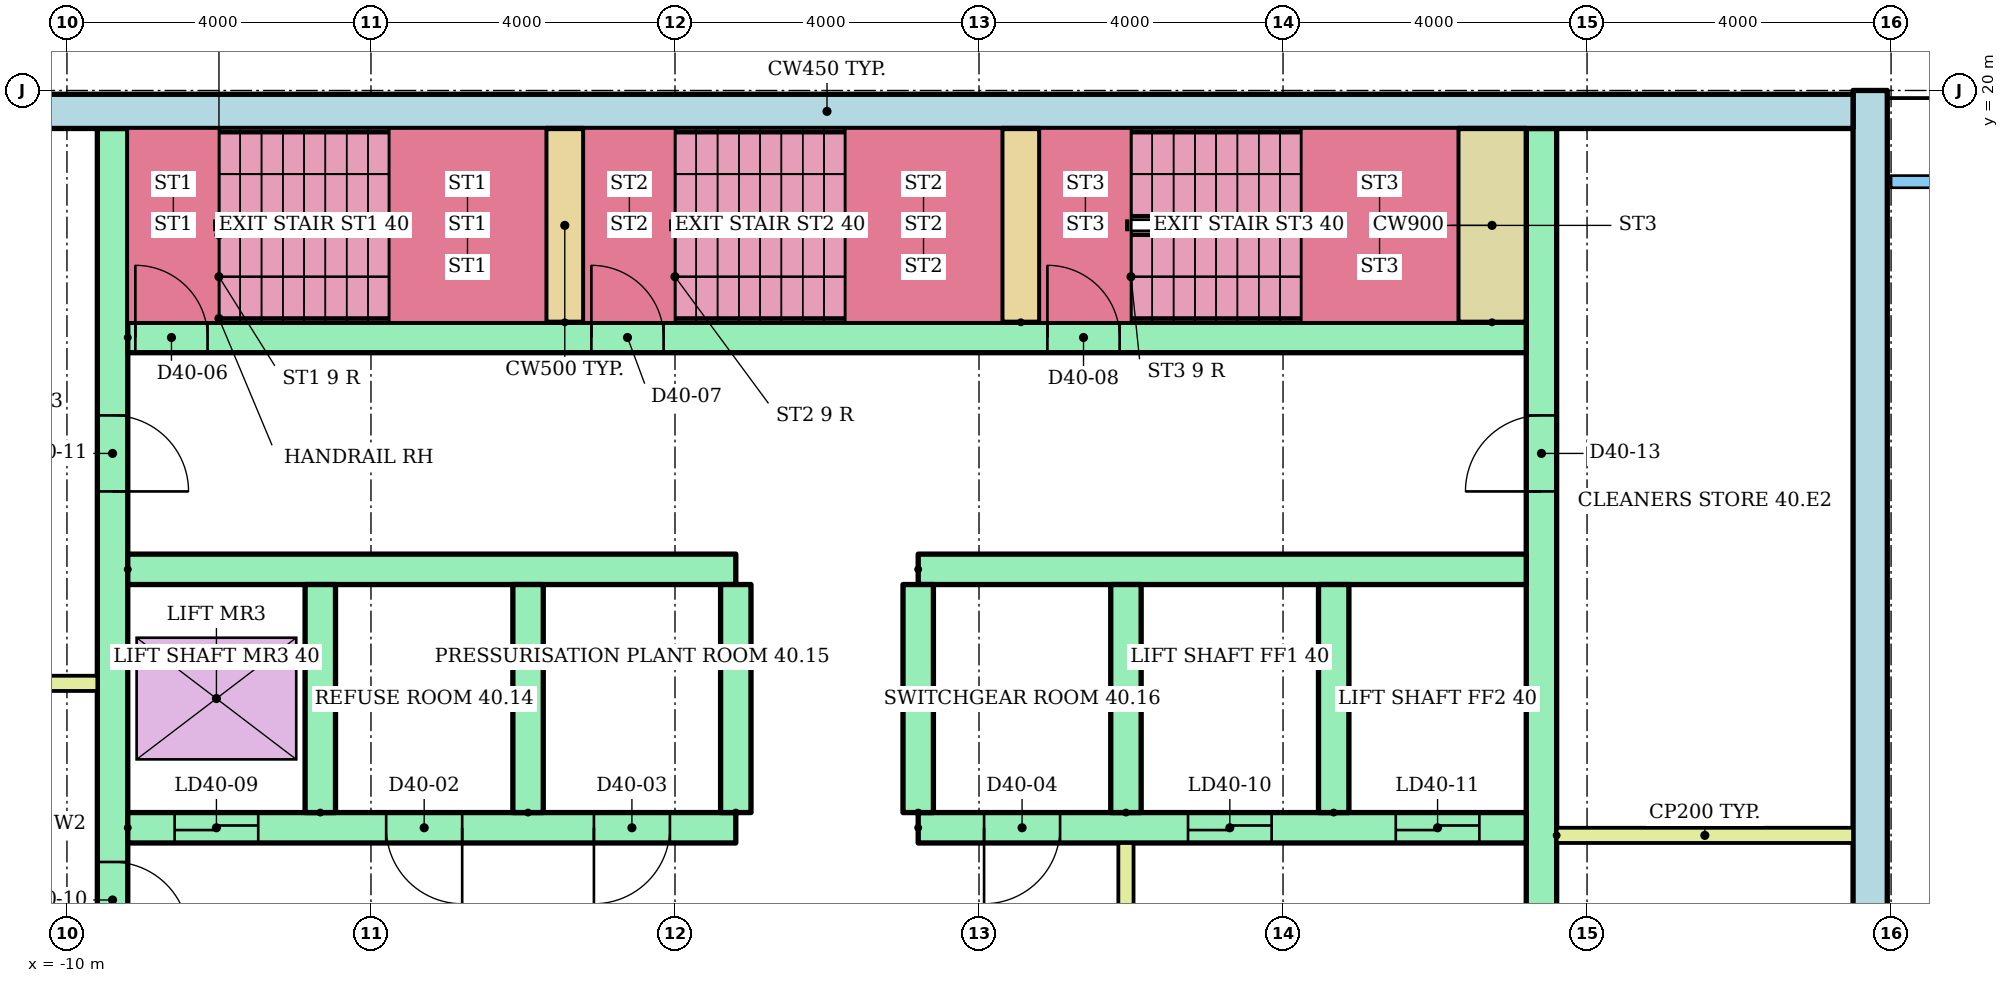
"""IFC4 building model, lengths in metres.
Left out: names, types, materials, properties, quantities, classifications, styles, units other than length and angle.
Written with IfcOpenShell. Run it as: python <this file> out.ifc"""

import sys

from ifc_helpers import new_model, si_unit, direction, frame, frame_2d, origin, place, context, subcontext, project, spatial, rectangle, extrude, element, fill, save


model = new_model("IFC4")
c1 = context("Model", 3, precision=1e-05, world=origin(), true_north=direction((0.0, 1.0)))
c2 = subcontext(c1, "Body", "Model", "MODEL_VIEW")
j1 = project(units=[si_unit("LENGTHUNIT", "METRE"), si_unit("PLANEANGLEUNIT", "RADIAN")], contexts=[c1])
p1 = place(None, origin())
s1 = spatial("IfcSite", under=j1, at=p1, CompositionType="ELEMENT")
p2 = place(p1, origin())
s2 = spatial("IfcBuilding", under=s1, at=p2, CompositionType="ELEMENT")
p3 = place(p2, frame((0.0, 0.0, 151.8)))
s3 = spatial("IfcBuildingStorey", under=s2, at=p3, CompositionType="ELEMENT", Elevation=151.8)
p4 = place(p3, frame((13.725, 3.0, 0.0), z_axis=(0.0, 0.0, 1.0), x_axis=(0.0, 1.0, 0.0)))
e1 = element("IfcWall", 1, at=p4, inside=s3, PredefinedType="SHEAR", context=c2, shape_type="SweptSolid", body=[
    extrude(rectangle(XDim=17.0, YDim=0.45, at=frame_2d((8.5, 0.0))), origin(), (0.0, 0.0, 1.0), 8.8),
])
p5 = place(p3, frame((-13.5, 19.725, 0.0)))
e2 = element("IfcWall", 2, at=p5, inside=s3, PredefinedType="SHEAR", context=c2, shape_type="SweptSolid", body=[
    extrude(rectangle(XDim=27.0, YDim=0.45, at=frame_2d((13.5, 0.0))), origin(), (0.0, 0.0, 1.0), 8.8),
])
p6 = place(p3, frame((-9.4, 6.8, 0.0), z_axis=(0.0, 0.0, 1.0), x_axis=(0.0, 1.0, 0.0)))
e3 = element("IfcWall", 3, at=p6, inside=s3, PredefinedType="SHEAR", context=c2, shape_type="SweptSolid", body=[
    extrude(rectangle(XDim=12.7, YDim=0.4, at=frame_2d((6.35, 0.0))), origin(), (0.0, 0.0, 1.0), 8.8),
])
p7 = place(p6, frame((0.3, 0.0, 0.0)))
e4 = element("IfcOpeningElement", 4, at=p7, cuts=e3, PredefinedType="OPENING", context=c2, shape_type="SweptSolid", body=[
    extrude(rectangle(XDim=1.0, YDim=2.1, at=frame_2d((0.5, 1.05))), frame((0.0, 0.21, 0.0), z_axis=(0.0, -1.0, 0.0), x_axis=(1.0, 0.0, 0.0)), (0.0, 0.0, 1.0), 0.42),
])
p8 = place(p6, frame((2.05, 0.0, 0.0)))
e5 = element("IfcOpeningElement", 5, at=p8, cuts=e3, PredefinedType="OPENING", context=c2, shape_type="SweptSolid", body=[
    extrude(rectangle(XDim=1.0, YDim=2.1, at=frame_2d((0.5, 1.05))), frame((0.0, 0.21, 0.0), z_axis=(0.0, -1.0, 0.0), x_axis=(1.0, 0.0, 0.0)), (0.0, 0.0, 1.0), 0.42),
])
p9 = place(p6, frame((7.925, 0.0, 0.0)))
e6 = element("IfcOpeningElement", 6, at=p9, cuts=e3, PredefinedType="OPENING", context=c2, shape_type="SweptSolid", body=[
    extrude(rectangle(XDim=1.0, YDim=2.1, at=frame_2d((0.5, 1.05))), frame((0.0, 0.21, 0.0), z_axis=(0.0, -1.0, 0.0), x_axis=(1.0, 0.0, 0.0)), (0.0, 0.0, 1.0), 0.42),
])
p10 = place(p3, frame((9.4, 6.8, 0.0), z_axis=(0.0, 0.0, 1.0), x_axis=(0.0, 1.0, 0.0)))
e7 = element("IfcWall", 7, at=p10, inside=s3, PredefinedType="SHEAR", context=c2, shape_type="SweptSolid", body=[
    extrude(rectangle(XDim=12.7, YDim=0.4, at=frame_2d((6.35, 0.0))), origin(), (0.0, 0.0, 1.0), 8.8),
])
p11 = place(p10, frame((1.15, 0.0, 0.0)))
e8 = element("IfcOpeningElement", 8, at=p11, cuts=e7, PredefinedType="OPENING", context=c2, shape_type="SweptSolid", body=[
    extrude(rectangle(XDim=1.0, YDim=2.1, at=frame_2d((0.5, 1.05))), frame((0.0, 0.21, 0.0), z_axis=(0.0, -1.0, 0.0), x_axis=(1.0, 0.0, 0.0)), (0.0, 0.0, 1.0), 0.42),
])
p12 = place(p10, frame((7.925, 0.0, 0.0)))
e9 = element("IfcOpeningElement", 9, at=p12, cuts=e7, PredefinedType="OPENING", context=c2, shape_type="SweptSolid", body=[
    extrude(rectangle(XDim=1.0, YDim=2.1, at=frame_2d((0.5, 1.05))), frame((0.0, 0.21, 0.0), z_axis=(0.0, -1.0, 0.0), x_axis=(1.0, 0.0, 0.0)), (0.0, 0.0, 1.0), 0.42),
])
p13 = place(p3, frame((-9.2, 10.3, 0.0)))
e10 = element("IfcWall", 10, at=p13, inside=s3, PredefinedType="SHEAR", context=c2, shape_type="SweptSolid", body=[
    extrude(rectangle(XDim=8.0, YDim=0.4, at=frame_2d((4.0, 0.0))), origin(), (0.0, 0.0, 1.0), 8.8),
])
p14 = place(p13, frame((0.617, 0.0, 0.0)))
e11 = element("IfcOpeningElement", 11, at=p14, cuts=e10, PredefinedType="OPENING", context=c2, shape_type="SweptSolid", body=[
    extrude(rectangle(XDim=1.1, YDim=2.1, at=frame_2d((0.55, 1.05))), frame((0.0, 0.21, 0.0), z_axis=(0.0, -1.0, 0.0), x_axis=(1.0, 0.0, 0.0)), (0.0, 0.0, 1.0), 0.42),
])
p15 = place(p13, frame((3.4, 0.0, 0.0)))
e12 = element("IfcOpeningElement", 12, at=p15, cuts=e10, PredefinedType="OPENING", context=c2, shape_type="SweptSolid", body=[
    extrude(rectangle(XDim=1.0, YDim=2.1, at=frame_2d((0.5, 1.05))), frame((0.0, 0.21, 0.0), z_axis=(0.0, -1.0, 0.0), x_axis=(1.0, 0.0, 0.0)), (0.0, 0.0, 1.0), 0.42),
])
p16 = place(p13, frame((6.133, 0.0, 0.0)))
e13 = element("IfcOpeningElement", 13, at=p16, cuts=e10, PredefinedType="OPENING", context=c2, shape_type="SweptSolid", body=[
    extrude(rectangle(XDim=1.0, YDim=2.1, at=frame_2d((0.5, 1.05))), frame((0.0, 0.21, 0.0), z_axis=(0.0, -1.0, 0.0), x_axis=(1.0, 0.0, 0.0)), (0.0, 0.0, 1.0), 0.42),
])
p17 = place(p3, frame((-9.2, 13.7, 0.0)))
e14 = element("IfcWall", 14, at=p17, inside=s3, PredefinedType="SHEAR", context=c2, shape_type="SweptSolid", body=[
    extrude(rectangle(XDim=8.0, YDim=0.4, at=frame_2d((4.0, 0.0))), origin(), (0.0, 0.0, 1.0), 8.8),
])
p18 = place(p3, frame((1.2, 10.3, 0.0)))
e15 = element("IfcWall", 15, at=p18, inside=s3, PredefinedType="SHEAR", context=c2, shape_type="SweptSolid", body=[
    extrude(rectangle(XDim=8.0, YDim=0.4, at=frame_2d((4.0, 0.0))), origin(), (0.0, 0.0, 1.0), 8.8),
])
p19 = place(p18, frame((3.55, 0.0, 0.0)))
e16 = element("IfcOpeningElement", 16, at=p19, cuts=e15, PredefinedType="OPENING", context=c2, shape_type="SweptSolid", body=[
    extrude(rectangle(XDim=1.1, YDim=2.1, at=frame_2d((0.55, 1.05))), frame((0.0, 0.21, 0.0), z_axis=(0.0, -1.0, 0.0), x_axis=(1.0, 0.0, 0.0)), (0.0, 0.0, 1.0), 0.42),
])
p20 = place(p18, frame((6.283, 0.0, 0.0)))
e17 = element("IfcOpeningElement", 17, at=p20, cuts=e15, PredefinedType="OPENING", context=c2, shape_type="SweptSolid", body=[
    extrude(rectangle(XDim=1.1, YDim=2.1, at=frame_2d((0.55, 1.05))), frame((0.0, 0.21, 0.0), z_axis=(0.0, -1.0, 0.0), x_axis=(1.0, 0.0, 0.0)), (0.0, 0.0, 1.0), 0.42),
])
p21 = place(p18, frame((0.867, 0.0, 0.0)))
e18 = element("IfcOpeningElement", 18, at=p21, cuts=e15, PredefinedType="OPENING", context=c2, shape_type="SweptSolid", body=[
    extrude(rectangle(XDim=1.0, YDim=2.1, at=frame_2d((0.5, 1.05))), frame((0.0, 0.21, 0.0), z_axis=(0.0, -1.0, 0.0), x_axis=(1.0, 0.0, 0.0)), (0.0, 0.0, 1.0), 0.42),
])
p22 = place(p3, frame((1.2, 13.7, 0.0)))
e19 = element("IfcWall", 19, at=p22, inside=s3, PredefinedType="SHEAR", context=c2, shape_type="SweptSolid", body=[
    extrude(rectangle(XDim=8.0, YDim=0.4, at=frame_2d((4.0, 0.0))), origin(), (0.0, 0.0, 1.0), 8.8),
])
for number, where, z_axis, x_axis in (
    (20, (-6.667, 10.5, 0.0), (0.0, 0.0, 1.0), (0.0, 1.0, 0.0)),
    (21, (-3.933, 10.5, 0.0), (0.0, 0.0, 1.0), (0.0, 1.0, 0.0)),
    (22, (-1.2, 10.5, 0.0), (0.0, 0.0, 1.0), (0.0, 1.0, 0.0)),
    (23, (1.2, 10.5, 0.0), (0.0, 0.0, 1.0), (0.0, 1.0, 0.0)),
    (24, (3.933, 10.5, 0.0), (0.0, 0.0, 1.0), (0.0, 1.0, 0.0)),
    (25, (6.667, 10.5, 0.0), (0.0, 0.0, 1.0), (0.0, 1.0, 0.0)),
):
    element("IfcWall", number, at=place(p3, frame(where, z_axis=z_axis, x_axis=x_axis)), inside=s3, PredefinedType="SHEAR", context=c2, shape_type="SweptSolid", body=[
        extrude(rectangle(XDim=3.0, YDim=0.4, at=frame_2d((1.5, 0.0))), origin(), (0.0, 0.0, 1.0), 8.8),
    ])
p23 = place(p3, frame((3.933, 6.8, 0.0), z_axis=(0.0, 0.0, 1.0), x_axis=(0.0, 1.0, 0.0)))
e26 = element("IfcWall", 26, at=p23, inside=s3, PredefinedType="PARTITIONING", context=c2, shape_type="SweptSolid", body=[
    extrude(rectangle(XDim=3.3, YDim=0.2, at=frame_2d((1.65, 0.0))), origin(), (0.0, 0.0, 1.0), 8.8),
])
p24 = place(p23, frame((1.1, 0.0, 0.0)))
e27 = element("IfcOpeningElement", 27, at=p24, cuts=e26, PredefinedType="OPENING", context=c2, shape_type="SweptSolid", body=[
    extrude(rectangle(XDim=1.1, YDim=2.1, at=frame_2d((0.55, 1.05))), frame((0.0, 0.11, 0.0), z_axis=(0.0, -1.0, 0.0), x_axis=(1.0, 0.0, 0.0)), (0.0, 0.0, 1.0), 0.22),
])
p25 = place(p3, frame((-9.2, 16.75, 0.0)))
e28 = element("IfcWall", 28, at=p25, inside=s3, PredefinedType="SHEAR", context=c2, shape_type="SweptSolid", body=[
    extrude(rectangle(XDim=18.4, YDim=0.4, at=frame_2d((9.2, 0.0))), origin(), (0.0, 0.0, 1.0), 8.8),
])
p26 = place(p25, frame((0.1, 0.0, 0.0)))
e29 = element("IfcOpeningElement", 29, at=p26, cuts=e28, PredefinedType="OPENING", context=c2, shape_type="SweptSolid", body=[
    extrude(rectangle(XDim=0.95, YDim=2.1, at=frame_2d((0.475, 1.05))), frame((0.0, 0.21, 0.0), z_axis=(0.0, -1.0, 0.0), x_axis=(1.0, 0.0, 0.0)), (0.0, 0.0, 1.0), 0.42),
])
p27 = place(p25, frame((6.1, 0.0, 0.0)))
e30 = element("IfcOpeningElement", 30, at=p27, cuts=e28, PredefinedType="OPENING", context=c2, shape_type="SweptSolid", body=[
    extrude(rectangle(XDim=0.95, YDim=2.1, at=frame_2d((0.475, 1.05))), frame((0.0, 0.21, 0.0), z_axis=(0.0, -1.0, 0.0), x_axis=(1.0, 0.0, 0.0)), (0.0, 0.0, 1.0), 0.42),
])
p28 = place(p25, frame((12.1, 0.0, 0.0)))
e31 = element("IfcOpeningElement", 31, at=p28, cuts=e28, PredefinedType="OPENING", context=c2, shape_type="SweptSolid", body=[
    extrude(rectangle(XDim=0.95, YDim=2.1, at=frame_2d((0.475, 1.05))), frame((0.0, 0.21, 0.0), z_axis=(0.0, -1.0, 0.0), x_axis=(1.0, 0.0, 0.0)), (0.0, 0.0, 1.0), 0.42),
])
for number, where, z_axis, x_axis in (
    (32, (-3.45, 16.95, 0.0), (0.0, 0.0, 1.0), (0.0, 1.0, 0.0)),
    (33, (2.55, 16.95, 0.0), (0.0, 0.0, 1.0), (0.0, 1.0, 0.0)),
):
    element("IfcWall", number, at=place(p3, frame(where, z_axis=z_axis, x_axis=x_axis)), inside=s3, PredefinedType="SHEAR", context=c2, shape_type="SweptSolid", body=[
        extrude(rectangle(XDim=2.55, YDim=0.5, at=frame_2d((1.275, 0.0))), origin(), (0.0, 0.0, 1.0), 8.8),
    ])
p29 = place(p3, frame((8.75, 16.95, 0.0), z_axis=(0.0, 0.0, 1.0), x_axis=(0.0, 1.0, 0.0)))
e34 = element("IfcWall", 34, at=p29, inside=s3, PredefinedType="SHEAR", context=c2, shape_type="SweptSolid", body=[
    extrude(rectangle(XDim=2.55, YDim=0.9, at=frame_2d((1.275, 0.0))), origin(), (0.0, 0.0, 1.0), 8.8),
])
for number, where in (
    (35, (-13.5, 12.2, 0.0)),
    (36, (9.6, 10.2, 0.0)),
):
    element("IfcWall", number, at=place(p3, frame(where)), inside=s3, PredefinedType="PARTITIONING", context=c2, shape_type="SweptSolid", body=[
        extrude(rectangle(XDim=3.9, YDim=0.2, at=frame_2d((1.95, 0.0))), origin(), (0.0, 0.0, 1.0), 8.8),
    ])
p30 = place(p14, origin())
e37 = element("IfcDoor", 37, at=p30, inside=s3, OperationType="SLIDING_TO_LEFT", PredefinedType="DOOR", context=c2, shape_type="SweptSolid", body=[
    extrude(rectangle(XDim=1.1, YDim=2.1, at=frame_2d((0.55, 1.05))), frame((0.0, 0.025, 0.0), z_axis=(0.0, -1.0, 0.0), x_axis=(1.0, 0.0, 0.0)), (0.0, 0.0, 1.0), 0.05),
])
fill(e11, e37)
p31 = place(p19, origin())
e38 = element("IfcDoor", 38, at=p31, inside=s3, OperationType="SLIDING_TO_LEFT", PredefinedType="DOOR", context=c2, shape_type="SweptSolid", body=[
    extrude(rectangle(XDim=1.1, YDim=2.1, at=frame_2d((0.55, 1.05))), frame((0.0, 0.025, 0.0), z_axis=(0.0, -1.0, 0.0), x_axis=(1.0, 0.0, 0.0)), (0.0, 0.0, 1.0), 0.05),
])
fill(e16, e38)
p32 = place(p20, origin())
e39 = element("IfcDoor", 39, at=p32, inside=s3, OperationType="SLIDING_TO_LEFT", PredefinedType="DOOR", context=c2, shape_type="SweptSolid", body=[
    extrude(rectangle(XDim=1.1, YDim=2.1, at=frame_2d((0.55, 1.05))), frame((0.0, 0.025, 0.0), z_axis=(0.0, -1.0, 0.0), x_axis=(1.0, 0.0, 0.0)), (0.0, 0.0, 1.0), 0.05),
])
fill(e17, e39)
p33 = place(p15, frame((1.0, 0.0, 0.0), z_axis=(0.0, 0.0, 1.0), x_axis=(-1.0, 0.0, 0.0)))
e40 = element("IfcDoor", 40, at=p33, inside=s3, OperationType="SINGLE_SWING_RIGHT", PredefinedType="DOOR", context=c2, shape_type="SweptSolid", body=[
    extrude(rectangle(XDim=1.0, YDim=2.1, at=frame_2d((0.5, 1.05))), frame((0.0, 0.025, 0.0), z_axis=(0.0, -1.0, 0.0), x_axis=(1.0, 0.0, 0.0)), (0.0, 0.0, 1.0), 0.05),
])
fill(e12, e40)
p34 = place(p16, frame((1.0, 0.0, 0.0), z_axis=(0.0, 0.0, 1.0), x_axis=(-1.0, 0.0, 0.0)))
e41 = element("IfcDoor", 41, at=p34, inside=s3, OperationType="SINGLE_SWING_LEFT", PredefinedType="DOOR", context=c2, shape_type="SweptSolid", body=[
    extrude(rectangle(XDim=1.0, YDim=2.1, at=frame_2d((0.5, 1.05))), frame((0.0, 0.025, 0.0), z_axis=(0.0, -1.0, 0.0), x_axis=(1.0, 0.0, 0.0)), (0.0, 0.0, 1.0), 0.05),
])
fill(e13, e41)
p35 = place(p21, frame((1.0, 0.0, 0.0), z_axis=(0.0, 0.0, 1.0), x_axis=(-1.0, 0.0, 0.0)))
e42 = element("IfcDoor", 42, at=p35, inside=s3, OperationType="SINGLE_SWING_LEFT", PredefinedType="DOOR", context=c2, shape_type="SweptSolid", body=[
    extrude(rectangle(XDim=1.0, YDim=2.1, at=frame_2d((0.5, 1.05))), frame((0.0, 0.025, 0.0), z_axis=(0.0, -1.0, 0.0), x_axis=(1.0, 0.0, 0.0)), (0.0, 0.0, 1.0), 0.05),
])
fill(e18, e42)
p36 = place(p26, origin())
e43 = element("IfcDoor", 43, at=p36, inside=s3, OperationType="SINGLE_SWING_LEFT", PredefinedType="DOOR", context=c2, shape_type="SweptSolid", body=[
    extrude(rectangle(XDim=0.95, YDim=2.1, at=frame_2d((0.475, 1.05))), frame((0.0, 0.025, 0.0), z_axis=(0.0, -1.0, 0.0), x_axis=(1.0, 0.0, 0.0)), (0.0, 0.0, 1.0), 0.05),
])
fill(e29, e43)
p37 = place(p27, origin())
e44 = element("IfcDoor", 44, at=p37, inside=s3, OperationType="SINGLE_SWING_LEFT", PredefinedType="DOOR", context=c2, shape_type="SweptSolid", body=[
    extrude(rectangle(XDim=0.95, YDim=2.1, at=frame_2d((0.475, 1.05))), frame((0.0, 0.025, 0.0), z_axis=(0.0, -1.0, 0.0), x_axis=(1.0, 0.0, 0.0)), (0.0, 0.0, 1.0), 0.05),
])
fill(e30, e44)
p38 = place(p28, origin())
e45 = element("IfcDoor", 45, at=p38, inside=s3, OperationType="SINGLE_SWING_LEFT", PredefinedType="DOOR", context=c2, shape_type="SweptSolid", body=[
    extrude(rectangle(XDim=0.95, YDim=2.1, at=frame_2d((0.475, 1.05))), frame((0.0, 0.025, 0.0), z_axis=(0.0, -1.0, 0.0), x_axis=(1.0, 0.0, 0.0)), (0.0, 0.0, 1.0), 0.05),
])
fill(e31, e45)
p39 = place(p8, frame((1.0, 0.0, 0.0), z_axis=(0.0, 0.0, 1.0), x_axis=(-1.0, 0.0, 0.0)))
e46 = element("IfcDoor", 46, at=p39, inside=s3, OperationType="SINGLE_SWING_LEFT", PredefinedType="DOOR", context=c2, shape_type="SweptSolid", body=[
    extrude(rectangle(XDim=1.0, YDim=2.1, at=frame_2d((0.5, 1.05))), frame((0.0, 0.025, 0.0), z_axis=(0.0, -1.0, 0.0), x_axis=(1.0, 0.0, 0.0)), (0.0, 0.0, 1.0), 0.05),
])
fill(e5, e46)
p40 = place(p9, frame((1.0, 0.0, 0.0), z_axis=(0.0, 0.0, 1.0), x_axis=(-1.0, 0.0, 0.0)))
e47 = element("IfcDoor", 47, at=p40, inside=s3, OperationType="SINGLE_SWING_LEFT", PredefinedType="DOOR", context=c2, shape_type="SweptSolid", body=[
    extrude(rectangle(XDim=1.0, YDim=2.1, at=frame_2d((0.5, 1.05))), frame((0.0, 0.025, 0.0), z_axis=(0.0, -1.0, 0.0), x_axis=(1.0, 0.0, 0.0)), (0.0, 0.0, 1.0), 0.05),
])
fill(e6, e47)
p41 = place(p12, origin())
e48 = element("IfcDoor", 48, at=p41, inside=s3, OperationType="SINGLE_SWING_LEFT", PredefinedType="DOOR", context=c2, shape_type="SweptSolid", body=[
    extrude(rectangle(XDim=1.0, YDim=2.1, at=frame_2d((0.5, 1.05))), frame((0.0, 0.025, 0.0), z_axis=(0.0, -1.0, 0.0), x_axis=(1.0, 0.0, 0.0)), (0.0, 0.0, 1.0), 0.05),
])
fill(e9, e48)
save(model, sys.argv[1])
